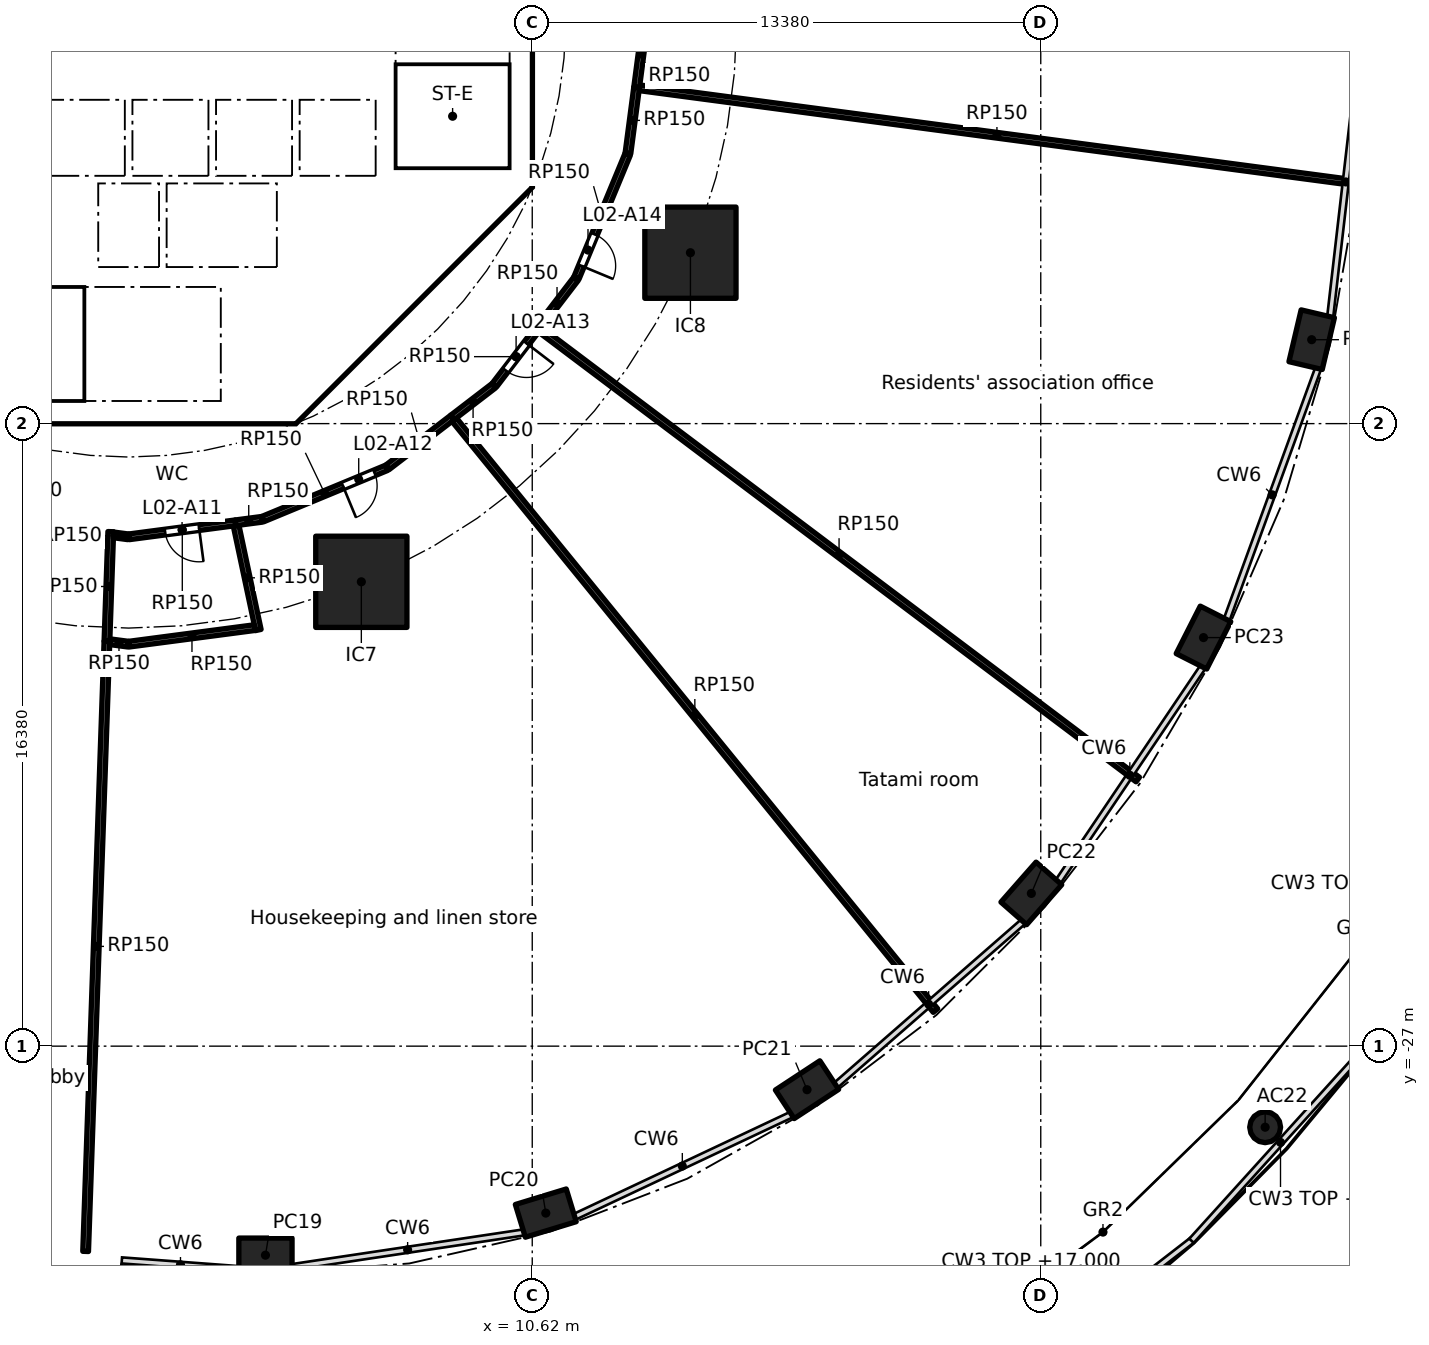
"""IFC4 building model, lengths in metres.
Left out: names, types, materials, properties, quantities, classifications, styles, units other than length and angle.
Written with IfcOpenShell. Run it as: python <this file> out.ifc"""

import sys

from ifc_helpers import new_model, si_unit, direction, frame, frame_2d, origin, origin_2d, place, context, subcontext, project, spatial, polyline, rectangle, hollow_rectangle, hollow_circle, outline, extrude, element, fill, save


model = new_model("IFC4")
c1 = context("Model", 3, precision=1e-05, world=origin(), true_north=direction((0.0, 1.0)))
c2 = subcontext(c1, "Body", "Model", "MODEL_VIEW")
j1 = project(units=[si_unit("LENGTHUNIT", "METRE"), si_unit("PLANEANGLEUNIT", "RADIAN")], contexts=[c1])
p1 = place(None, origin())
s1 = spatial("IfcSite", under=j1, at=p1, CompositionType="ELEMENT")
p2 = place(p1, origin())
s2 = spatial("IfcBuilding", under=s1, at=p2, CompositionType="ELEMENT")
p3 = place(p2, frame((0.0, 0.0, 12.0)))
s3 = spatial("IfcBuildingStorey", under=s2, at=p3, CompositionType="ELEMENT", Elevation=12.0)
for number, where, z_axis, x_axis in (
    (1, (3.6, -32.5, 0.0), (0.0, 0.0, 1.0), (1.0, 0.0, 0.0)),
    (2, (10.976, -31.393, 0.0), (0.0, 0.0, 1.0), (0.957, 0.292, 0.0)),
    (3, (17.85, -28.146, 0.0), (0.0, 0.0, 1.0), (0.836, 0.549, 0.0)),
    (4, (23.752, -22.981, 0.0), (0.0, 0.0, 1.0), (0.66, 0.751, 0.0)),
    (5, (28.282, -16.25, 0.0), (0.0, 0.0, 1.0), (0.452, 0.892, 0.0)),
    (6, (31.129, -8.412, 0.0), (0.0, 0.0, 1.0), (0.229, 0.973, 0.0)),
):
    element("IfcColumn", number, at=place(p3, frame(where, z_axis=z_axis, x_axis=x_axis)), inside=s3, PredefinedType="COLUMN", context=c2, shape_type="SweptSolid", body=[
        extrude(hollow_rectangle(XDim=1.4, YDim=0.9, WallThickness=0.05, at=origin_2d()), origin(), (0.0, 0.0, 1.0), 5.0),
    ])
for number, where, z_axis, x_axis in (
    (7, (6.123, -14.782, 0.0), (0.0, 0.0, 1.0), (1.0, 0.0, 0.0)),
    (8, (14.782, -6.123, 0.0), (0.0, 0.0, 1.0), (1.0, 0.0, 0.0)),
):
    element("IfcColumn", number, at=place(p3, frame(where, z_axis=z_axis, x_axis=x_axis)), inside=s3, PredefinedType="COLUMN", context=c2, shape_type="SweptSolid", body=[
        extrude(rectangle(XDim=2.4, YDim=2.4, at=origin_2d()), origin(), (0.0, 0.0, 1.0), 5.0),
    ])
p4 = place(p3, frame((29.904, -29.133, 0.0), z_axis=(0.0, 0.0, 1.0), x_axis=(1.0, 0.0, 0.0)))
e9 = element("IfcColumn", 9, at=p4, inside=s3, PredefinedType="COLUMN", context=c2, shape_type="SweptSolid", body=[
    extrude(hollow_circle(Radius=0.406, WallThickness=0.025, at=origin_2d()), origin(), (0.0, 0.0, 1.0), 5.0),
])
p5 = place(p3, frame((4.613, -9.988, 0.0), z_axis=(0.0, 0.0, 1.0), x_axis=(0.707106781187, 0.707106781187, 0.0)))
e10 = element("IfcWall", 10, at=p5, inside=s3, PredefinedType="SHEAR", context=c2, shape_type="SweptSolid", body=[
    extrude(rectangle(XDim=7.602, YDim=0.6, at=frame_2d((3.801, 0.0))), origin(), (0.0, 0.0, 1.0), 4.7),
])
p6 = place(p5, frame((3.201, 0.0, 0.0)))
e11 = element("IfcOpeningElement", 11, at=p6, cuts=e10, PredefinedType="OPENING", context=c2, shape_type="SweptSolid", body=[
    extrude(rectangle(XDim=1.2, YDim=2.1, at=frame_2d((0.6, 1.05))), frame((0.0, 0.31, 0.0), z_axis=(0.0, -1.0, 0.0), x_axis=(1.0, 0.0, 0.0)), (0.0, 0.0, 1.0), 0.62),
])
p7 = place(p3, frame((4.0, -10.025, 0.0), z_axis=(0.0, 0.0, 1.0), x_axis=(0.0, 1.0, 0.0)))
e12 = element("IfcWall", 12, at=p7, inside=s3, PredefinedType="SOLIDWALL", context=c2, shape_type="SweptSolid", body=[
    extrude(rectangle(XDim=3.0, YDim=0.2, at=frame_2d((1.5, 0.0))), origin(), (0.0, 0.0, 1.0), 4.7),
])
p8 = place(p7, frame((0.975, 0.0, 0.0)))
e13 = element("IfcOpeningElement", 13, at=p8, cuts=e12, PredefinedType="OPENING", context=c2, shape_type="SweptSolid", body=[
    extrude(rectangle(XDim=1.1, YDim=2.1, at=frame_2d((0.55, 1.05))), frame((0.0, 0.11, 0.0), z_axis=(0.0, -1.0, 0.0), x_axis=(1.0, 0.0, 0.0)), (0.0, 0.0, 1.0), 0.22),
])
p9 = place(p3, frame((4.0, -6.5, 0.0), z_axis=(0.0, 0.0, 1.0), x_axis=(0.0, 1.0, 0.0)))
e14 = element("IfcWall", 14, at=p9, inside=s3, PredefinedType="SOLIDWALL", context=c2, shape_type="SweptSolid", body=[
    extrude(rectangle(XDim=2.2, YDim=0.2, at=frame_2d((1.1, 0.0))), origin(), (0.0, 0.0, 1.0), 4.7),
])
p10 = place(p9, frame((0.55, 0.0, 0.0)))
e15 = element("IfcOpeningElement", 15, at=p10, cuts=e14, PredefinedType="OPENING", context=c2, shape_type="SweptSolid", body=[
    extrude(rectangle(XDim=1.1, YDim=2.1, at=frame_2d((0.55, 1.05))), frame((0.0, 0.11, 0.0), z_axis=(0.0, -1.0, 0.0), x_axis=(1.0, 0.0, 0.0)), (0.0, 0.0, 1.0), 0.22),
])
p11 = place(p3, frame((-6.7, -2.0, 0.0), z_axis=(0.0, 0.0, 1.0), x_axis=(1.0, 0.0, 0.0)))
e16 = element("IfcWall", 16, at=p11, inside=s3, PredefinedType="SOLIDWALL", context=c2, shape_type="SweptSolid", body=[
    extrude(rectangle(XDim=13.4, YDim=0.2, at=frame_2d((6.7, 0.0))), origin(), (0.0, 0.0, 1.0), 4.7),
])
p12 = place(p11, frame((0.65, 0.0, 0.0)))
e17 = element("IfcOpeningElement", 17, at=p12, cuts=e16, PredefinedType="OPENING", context=c2, shape_type="SweptSolid", body=[
    extrude(rectangle(XDim=1.1, YDim=2.1, at=frame_2d((0.55, 1.05))), frame((0.0, 0.11, 0.0), z_axis=(0.0, -1.0, 0.0), x_axis=(1.0, 0.0, 0.0)), (0.0, 0.0, 1.0), 0.22),
])
p13 = place(p11, frame((2.85, 0.0, 0.0)))
e18 = element("IfcOpeningElement", 18, at=p13, cuts=e16, PredefinedType="OPENING", context=c2, shape_type="SweptSolid", body=[
    extrude(rectangle(XDim=1.1, YDim=2.1, at=frame_2d((0.55, 1.05))), frame((0.0, 0.11, 0.0), z_axis=(0.0, -1.0, 0.0), x_axis=(1.0, 0.0, 0.0)), (0.0, 0.0, 1.0), 0.22),
])
p14 = place(p3, origin())
e19 = element("IfcWall", 19, at=p14, inside=s3, PredefinedType="SHEAR", context=c2, shape_type="SweptSolid", body=[
    extrude(outline(polyline([(-4.152, -10.025), (4.152, -10.025), (4.401, -9.776), (4.825, -10.2), (4.401, -10.625), (-4.401, -10.625), (-4.825, -10.2), (-4.401, -9.776), (-4.152, -10.025)])), origin(), (0.0, 0.0, 1.0), 4.7),
])
p15 = place(p3, origin())
e20 = element("IfcWall", 20, at=p15, inside=s3, PredefinedType="SHEAR", context=c2, shape_type="SweptSolid", body=[
    extrude(outline(polyline([(9.776, -4.401), (10.025, -4.152), (10.025, -3.801), (10.025, 4.152), (9.776, 4.401), (10.2, 4.825), (10.625, 4.401), (10.625, -4.401), (10.2, -4.825), (9.776, -4.401)])), origin(), (0.0, 0.0, 1.0), 4.7),
])
for number, where, z_axis, x_axis in (
    (21, (-0.9, -6.5, 0.0), (0.0, 0.0, 1.0), (0.0, 1.0, 0.0)),
    (22, (0.9, -6.5, 0.0), (0.0, 0.0, 1.0), (0.0, 1.0, 0.0)),
):
    element("IfcWall", number, at=place(p3, frame(where, z_axis=z_axis, x_axis=x_axis)), inside=s3, PredefinedType="SOLIDWALL", context=c2, shape_type="SweptSolid", body=[
        extrude(rectangle(XDim=2.2, YDim=0.2, at=frame_2d((1.1, 0.0))), origin(), (0.0, 0.0, 1.0), 4.7),
    ])
p16 = place(p3, origin())
e23 = element("IfcWall", 23, at=p16, inside=s3, PredefinedType="SOLIDWALL", context=c2, shape_type="SweptSolid", body=[
    extrude(outline(polyline([(-6.7, -2.1), (-6.5, -2.1), (-6.5, -4.1), (-4.5, -4.1), (-4.5, -2.1), (-4.3, -2.1), (-4.3, -4.1), (-2.3, -4.1), (-2.3, -2.1), (-2.1, -2.1), (-2.1, -4.1), (-0.1, -4.1), (-0.1, -2.1), (0.1, -2.1), (0.1, -4.1), (2.1, -4.1), (2.1, -2.1), (2.3, -2.1), (2.3, -4.1), (4.3, -4.1), (4.3, -2.1), (4.5, -2.1), (4.5, -4.1), (6.5, -4.1), (6.5, -2.1), (6.7, -2.1), (6.7, -4.3), (-6.7, -4.3), (-6.7, -2.1)])), origin(), (0.0, 0.0, 1.0), 4.7),
])
p17 = place(p3, origin())
e24 = element("IfcWall", 24, at=p17, inside=s3, PredefinedType="SOLIDWALL", context=c2, shape_type="SweptSolid", body=[
    extrude(outline(polyline([(4.1, -7.025), (-4.1, -7.025), (-4.1, -6.5), (4.1, -6.5), (4.1, -7.025)])), origin(), (0.0, 0.0, 1.0), 4.7),
])
p18 = place(p3, origin())
e25 = element("IfcWall", 25, at=p18, inside=s3, PredefinedType="SOLIDWALL", context=c2, shape_type="SweptSolid", body=[
    extrude(outline(polyline([(7.025, -3.9), (6.7, -3.9), (6.7, 3.9), (7.025, 3.9), (7.025, -3.9)])), origin(), (0.0, 0.0, 1.0), 4.7),
])
p19 = place(p3, origin())
e26 = element("IfcWall", 26, at=p19, inside=s3, PredefinedType="SOLIDWALL", context=c2, shape_type="SweptSolid", body=[
    extrude(outline(polyline([(10.025, -4.1), (6.7, -4.1), (6.7, -3.9), (10.025, -3.9), (10.025, -4.1)])), origin(), (0.0, 0.0, 1.0), 4.7),
])
p20 = place(p3, frame((-0.571, -16.349, 0.0), z_axis=(0.0, 0.0, 1.0), x_axis=(-0.034915122528, -0.999390281231, 0.0)))
e27 = element("IfcWall", 27, at=p20, inside=s3, PredefinedType="PARTITIONING", context=c2, shape_type="SweptSolid", body=[
    extrude(rectangle(XDim=16.062, YDim=0.15, at=frame_2d((8.031, 0.0))), origin(), (0.0, 0.0, 1.0), 4.7),
])
p21 = place(p3, frame((-0.47, -13.462, 0.0), z_axis=(0.0, 0.0, 1.0), x_axis=(-0.034907670303, -0.999390541557, 0.0)))
e28 = element("IfcWall", 28, at=p21, inside=s3, PredefinedType="PARTITIONING", context=c2, shape_type="SweptSolid", body=[
    extrude(rectangle(XDim=2.888, YDim=0.15, at=frame_2d((1.444, 0.0))), origin(), (0.0, 0.0, 1.0), 4.7),
])
p22 = place(p3, frame((-0.012, -16.423, 0.0), z_axis=(0.0, 0.0, 1.0), x_axis=(-0.991457697021, 0.130428658731, 0.0)))
e29 = element("IfcWall", 29, at=p22, inside=s3, PredefinedType="PARTITIONING", context=c2, shape_type="SweptSolid", body=[
    extrude(rectangle(XDim=0.489, YDim=0.15, at=frame_2d((0.244, 0.0))), origin(), (0.0, 0.0, 1.0), 4.7),
])
p23 = place(p3, frame((-0.012, -13.598, 0.0), z_axis=(0.0, 0.0, 1.0), x_axis=(-0.991467089631, 0.130357240609, 0.0)))
e30 = element("IfcWall", 30, at=p23, inside=s3, PredefinedType="PARTITIONING", context=c2, shape_type="SweptSolid", body=[
    extrude(rectangle(XDim=0.39, YDim=0.15, at=frame_2d((0.195, 0.0))), origin(), (0.0, 0.0, 1.0), 4.7),
])
p24 = place(p3, frame((2.812, -13.23, 0.0), z_axis=(0.0, 0.0, 1.0), x_axis=(-0.991445467051, -0.130521591565, 0.0)))
e31 = element("IfcWall", 31, at=p24, inside=s3, PredefinedType="PARTITIONING", context=c2, shape_type="SweptSolid", body=[
    extrude(rectangle(XDim=2.824, YDim=0.15, at=frame_2d((1.412, 0.0))), origin(), (0.0, 0.0, 1.0), 4.7),
])
p25 = place(p24, frame((0.968, 0.0, 0.0)))
e32 = element("IfcOpeningElement", 32, at=p25, cuts=e31, PredefinedType="OPENING", context=c2, shape_type="SweptSolid", body=[
    extrude(rectangle(XDim=0.9, YDim=2.1, at=frame_2d((0.45, 1.05))), frame((0.0, 0.085, 0.0), z_axis=(0.0, -1.0, 0.0), x_axis=(1.0, 0.0, 0.0)), (0.0, 0.0, 1.0), 0.17),
])
p26 = place(p3, frame((2.828, -13.303, 0.0), z_axis=(0.0, 0.0, 1.0), x_axis=(0.207920091501, -0.978145815076, 0.0)))
e33 = element("IfcWall", 33, at=p26, inside=s3, PredefinedType="PARTITIONING", context=c2, shape_type="SweptSolid", body=[
    extrude(rectangle(XDim=2.809, YDim=0.15, at=frame_2d((1.404, 0.0))), origin(), (0.0, 0.0, 1.0), 4.7),
])
p27 = place(p3, frame((3.321, -15.987, 0.0), z_axis=(0.0, 0.0, 1.0), x_axis=(-0.991441844339, -0.130549106827, 0.0)))
e34 = element("IfcWall", 34, at=p27, inside=s3, PredefinedType="PARTITIONING", context=c2, shape_type="SweptSolid", body=[
    extrude(rectangle(XDim=3.338, YDim=0.15, at=frame_2d((1.669, 0.0))), origin(), (0.0, 0.0, 1.0), 4.7),
])
p28 = place(p3, frame((3.508, -13.138, 0.0), z_axis=(0.0, 0.0, 1.0), x_axis=(-0.991460212813, -0.130409533429, 0.0)))
e35 = element("IfcWall", 35, at=p28, inside=s3, PredefinedType="PARTITIONING", context=c2, shape_type="SweptSolid", body=[
    extrude(rectangle(XDim=0.702, YDim=0.15, at=frame_2d((0.351, 0.0))), origin(), (0.0, 0.0, 1.0), 4.7),
])
p29 = place(p3, frame((6.789, -11.782, 0.0), z_axis=(0.0, 0.0, 1.0), x_axis=(-0.923881838111, -0.382677866108, 0.0)))
e36 = element("IfcWall", 36, at=p29, inside=s3, PredefinedType="PARTITIONING", context=c2, shape_type="SweptSolid", body=[
    extrude(rectangle(XDim=3.527, YDim=0.15, at=frame_2d((1.763, 0.0))), origin(), (0.0, 0.0, 1.0), 4.7),
])
p30 = place(p29, frame((0.346, 0.0, 0.0)))
e37 = element("IfcOpeningElement", 37, at=p30, cuts=e36, PredefinedType="OPENING", context=c2, shape_type="SweptSolid", body=[
    extrude(rectangle(XDim=0.9, YDim=2.1, at=frame_2d((0.45, 1.05))), frame((0.0, 0.085, 0.0), z_axis=(0.0, -1.0, 0.0), x_axis=(1.0, 0.0, 0.0)), (0.0, 0.0, 1.0), 0.17),
])
p31 = place(p3, frame((8.519, -10.459, 0.0), z_axis=(0.0, 0.0, 1.0), x_axis=(-0.793372937326, -0.608735888805, 0.0)))
e38 = element("IfcWall", 38, at=p31, inside=s3, PredefinedType="PARTITIONING", context=c2, shape_type="SweptSolid", body=[
    extrude(rectangle(XDim=2.155, YDim=0.15, at=frame_2d((1.078, 0.0))), origin(), (0.0, 0.0, 1.0), 4.7),
])
p32 = place(p3, frame((8.567, -10.517, 0.0), z_axis=(0.0, 0.0, 1.0), x_axis=(0.631550170727, -0.775335012658, 0.0)))
e39 = element("IfcWall", 39, at=p32, inside=s3, PredefinedType="PARTITIONING", context=c2, shape_type="SweptSolid", body=[
    extrude(rectangle(XDim=20.051, YDim=0.15, at=frame_2d((10.026, 0.0))), origin(), (0.0, 0.0, 1.0), 4.7),
])
p33 = place(p3, frame((9.607, -9.624, 0.0), z_axis=(0.0, 0.0, 1.0), x_axis=(-0.793371316762, -0.6087380009, 0.0)))
e40 = element("IfcWall", 40, at=p33, inside=s3, PredefinedType="PARTITIONING", context=c2, shape_type="SweptSolid", body=[
    extrude(rectangle(XDim=1.371, YDim=0.15, at=frame_2d((0.686, 0.0))), origin(), (0.0, 0.0, 1.0), 4.7),
])
p34 = place(p3, frame((10.774, -8.109, 0.0), z_axis=(0.0, 0.0, 1.0), x_axis=(-0.608754453805, -0.793358692504, 0.0)))
e41 = element("IfcWall", 41, at=p34, inside=s3, PredefinedType="PARTITIONING", context=c2, shape_type="SweptSolid", body=[
    extrude(rectangle(XDim=1.888, YDim=0.15, at=frame_2d((0.944, 0.0))), origin(), (0.0, 0.0, 1.0), 4.7),
])
p35 = place(p34, frame((0.5, 0.0, 0.0)))
e42 = element("IfcOpeningElement", 42, at=p35, cuts=e41, PredefinedType="OPENING", context=c2, shape_type="SweptSolid", body=[
    extrude(rectangle(XDim=0.9, YDim=2.1, at=frame_2d((0.45, 1.05))), frame((0.0, 0.085, 0.0), z_axis=(0.0, -1.0, 0.0), x_axis=(1.0, 0.0, 0.0)), (0.0, 0.0, 1.0), 0.17),
])
p36 = place(p3, frame((10.833, -8.154, 0.0), z_axis=(0.0, 0.0, 1.0), x_axis=(0.798984754133, -0.601351280586, 0.0)))
e43 = element("IfcWall", 43, at=p36, inside=s3, PredefinedType="PARTITIONING", context=c2, shape_type="SweptSolid", body=[
    extrude(rectangle(XDim=19.674, YDim=0.15, at=frame_2d((9.837, 0.0))), origin(), (0.0, 0.0, 1.0), 4.7),
])
p37 = place(p3, frame((11.771, -6.809, 0.0), z_axis=(0.0, 0.0, 1.0), x_axis=(-0.608716251771, -0.793388003961, 0.0)))
e44 = element("IfcWall", 44, at=p37, inside=s3, PredefinedType="PARTITIONING", context=c2, shape_type="SweptSolid", body=[
    extrude(rectangle(XDim=1.638, YDim=0.15, at=frame_2d((0.819, 0.0))), origin(), (0.0, 0.0, 1.0), 4.7),
])
p38 = place(p3, frame((13.132, -3.531, 0.0), z_axis=(0.0, 0.0, 1.0), x_axis=(-0.382677866108, -0.923881838111, 0.0)))
e45 = element("IfcWall", 45, at=p38, inside=s3, PredefinedType="PARTITIONING", context=c2, shape_type="SweptSolid", body=[
    extrude(rectangle(XDim=3.527, YDim=0.15, at=frame_2d((1.763, 0.0))), origin(), (0.0, 0.0, 1.0), 4.7),
])
p39 = place(p38, frame((2.281, 0.0, 0.0)))
e46 = element("IfcOpeningElement", 46, at=p39, cuts=e45, PredefinedType="OPENING", context=c2, shape_type="SweptSolid", body=[
    extrude(rectangle(XDim=0.9, YDim=2.1, at=frame_2d((0.45, 1.05))), frame((0.0, 0.085, 0.0), z_axis=(0.0, -1.0, 0.0), x_axis=(1.0, 0.0, 0.0)), (0.0, 0.0, 1.0), 0.17),
])
p40 = place(p3, frame((13.366, -1.774, 0.0), z_axis=(0.0, 0.0, 1.0), x_axis=(-0.130526735914, -0.991444789795, 0.0)))
e47 = element("IfcWall", 47, at=p40, inside=s3, PredefinedType="PARTITIONING", context=c2, shape_type="SweptSolid", body=[
    extrude(rectangle(XDim=1.749, YDim=0.15, at=frame_2d((0.875, 0.0))), origin(), (0.0, 0.0, 1.0), 4.7),
])
p41 = place(p3, frame((13.441, -1.784, 0.0), z_axis=(0.0, 0.0, 1.0), x_axis=(0.991305479384, -0.131580570535, 0.0)))
e48 = element("IfcWall", 48, at=p41, inside=s3, PredefinedType="PARTITIONING", context=c2, shape_type="SweptSolid", body=[
    extrude(rectangle(XDim=18.978, YDim=0.15, at=frame_2d((9.489, 0.0))), origin(), (0.0, 0.0, 1.0), 4.7),
])
p42 = place(p3, frame((13.598, -0.012, 0.0), z_axis=(0.0, 0.0, 1.0), x_axis=(-0.130472275964, -0.991451958092, 0.0)))
e49 = element("IfcWall", 49, at=p42, inside=s3, PredefinedType="PARTITIONING", context=c2, shape_type="SweptSolid", body=[
    extrude(rectangle(XDim=1.778, YDim=0.15, at=frame_2d((0.889, 0.0))), origin(), (0.0, 0.0, 1.0), 4.7),
])
p43 = place(p10, origin())
e50 = element("IfcDoor", 50, at=p43, inside=s3, OperationType="DOUBLE_DOOR_SLIDING", PredefinedType="DOOR", context=c2, shape_type="SweptSolid", body=[
    extrude(rectangle(XDim=1.1, YDim=2.1, at=frame_2d((0.55, 1.05))), frame((0.0, 0.025, 0.0), z_axis=(0.0, -1.0, 0.0), x_axis=(1.0, 0.0, 0.0)), (0.0, 0.0, 1.0), 0.05),
])
fill(e15, e50)
p44 = place(p8, origin())
e51 = element("IfcDoor", 51, at=p44, inside=s3, OperationType="SINGLE_SWING_LEFT", PredefinedType="DOOR", context=c2, shape_type="SweptSolid", body=[
    extrude(rectangle(XDim=1.1, YDim=2.1, at=frame_2d((0.55, 1.05))), frame((0.0, 0.025, 0.0), z_axis=(0.0, -1.0, 0.0), x_axis=(1.0, 0.0, 0.0)), (0.0, 0.0, 1.0), 0.05),
])
fill(e13, e51)
p45 = place(p6, origin())
e52 = element("IfcDoor", 52, at=p45, inside=s3, OperationType="SINGLE_SWING_RIGHT", PredefinedType="DOOR", context=c2, shape_type="SweptSolid", body=[
    extrude(rectangle(XDim=1.2, YDim=2.1, at=frame_2d((0.6, 1.05))), frame((0.0, 0.025, 0.0), z_axis=(0.0, -1.0, 0.0), x_axis=(1.0, 0.0, 0.0)), (0.0, 0.0, 1.0), 0.05),
])
fill(e11, e52)
p46 = place(p25, origin())
e53 = element("IfcDoor", 53, at=p46, inside=s3, OperationType="SINGLE_SWING_LEFT", PredefinedType="DOOR", context=c2, shape_type="SweptSolid", body=[
    extrude(rectangle(XDim=0.9, YDim=2.1, at=frame_2d((0.45, 1.05))), frame((0.0, 0.025, 0.0), z_axis=(0.0, -1.0, 0.0), x_axis=(1.0, 0.0, 0.0)), (0.0, 0.0, 1.0), 0.05),
])
fill(e32, e53)
p47 = place(p30, origin())
e54 = element("IfcDoor", 54, at=p47, inside=s3, OperationType="SINGLE_SWING_RIGHT", PredefinedType="DOOR", context=c2, shape_type="SweptSolid", body=[
    extrude(rectangle(XDim=0.9, YDim=2.1, at=frame_2d((0.45, 1.05))), frame((0.0, 0.025, 0.0), z_axis=(0.0, -1.0, 0.0), x_axis=(1.0, 0.0, 0.0)), (0.0, 0.0, 1.0), 0.05),
])
fill(e37, e54)
p48 = place(p35, origin())
e55 = element("IfcDoor", 55, at=p48, inside=s3, OperationType="SINGLE_SWING_LEFT", PredefinedType="DOOR", context=c2, shape_type="SweptSolid", body=[
    extrude(rectangle(XDim=0.9, YDim=2.1, at=frame_2d((0.45, 1.05))), frame((0.0, 0.025, 0.0), z_axis=(0.0, -1.0, 0.0), x_axis=(1.0, 0.0, 0.0)), (0.0, 0.0, 1.0), 0.05),
])
fill(e42, e55)
p49 = place(p39, origin())
e56 = element("IfcDoor", 56, at=p49, inside=s3, OperationType="SINGLE_SWING_RIGHT", PredefinedType="DOOR", context=c2, shape_type="SweptSolid", body=[
    extrude(rectangle(XDim=0.9, YDim=2.1, at=frame_2d((0.45, 1.05))), frame((0.0, 0.025, 0.0), z_axis=(0.0, -1.0, 0.0), x_axis=(1.0, 0.0, 0.0)), (0.0, 0.0, 1.0), 0.05),
])
fill(e46, e56)
save(model, sys.argv[1])
